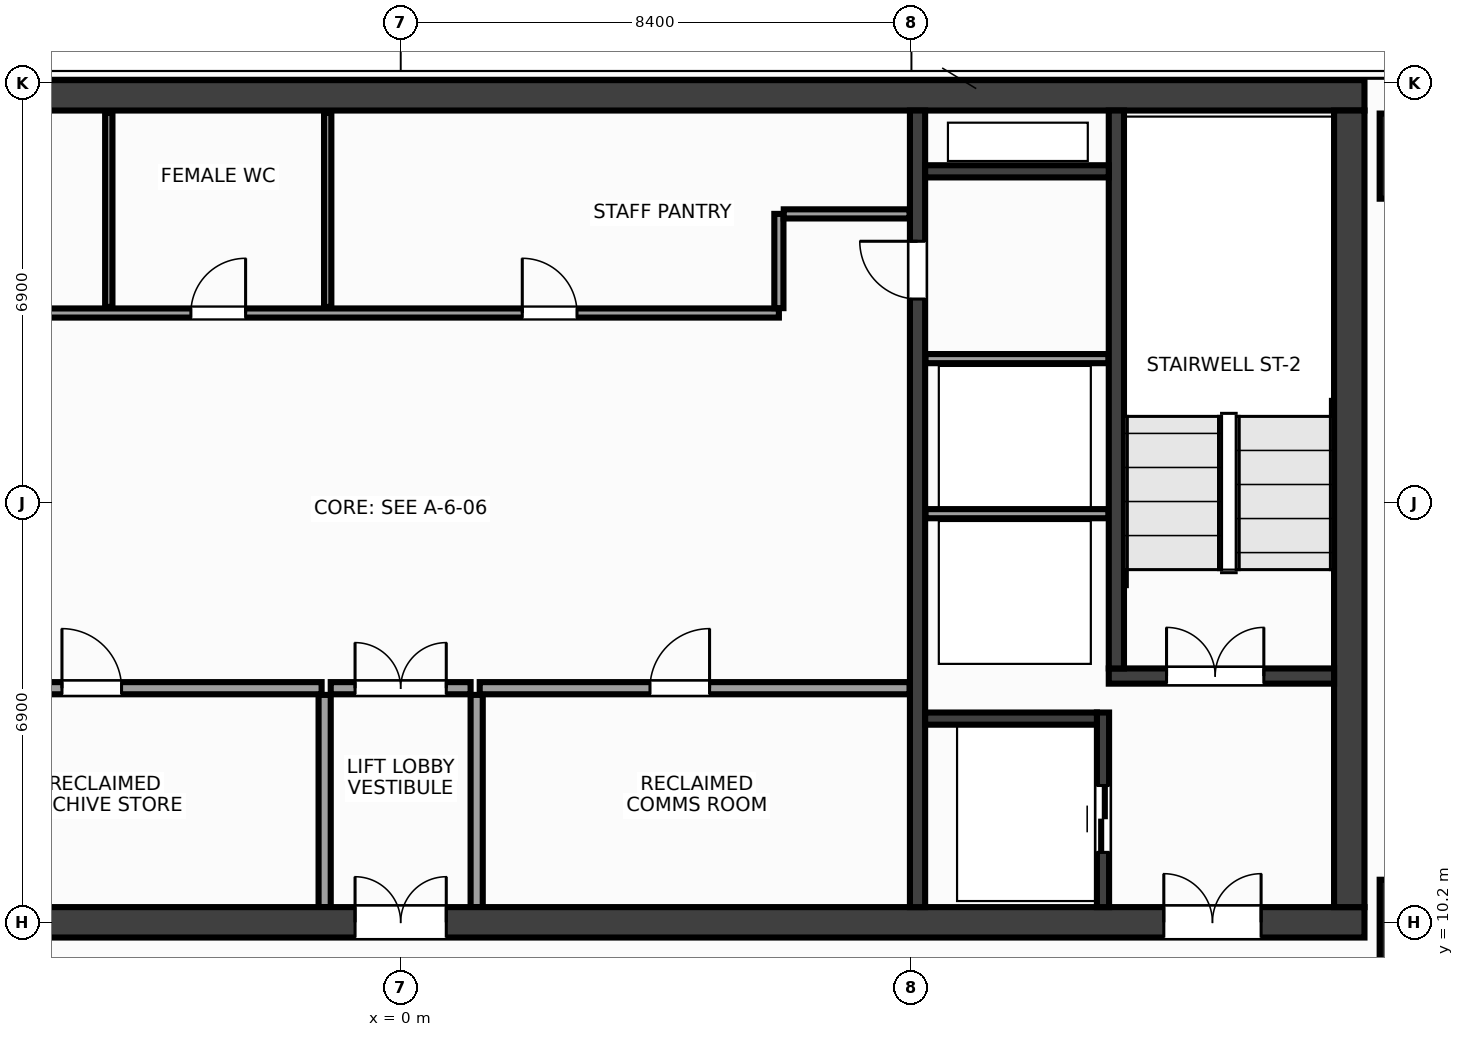
"""IFC4 building model, lengths in metres.
Left out: names, types, materials, properties, quantities, classifications, styles, units other than length and angle.
Written with IfcOpenShell. Run it as: python <this file> out.ifc"""

import sys

from ifc_helpers import new_model, si_unit, direction, frame, frame_2d, origin, origin_2d, place, context, subcontext, project, spatial, rectangle, extrude, source, transform, mapped, element, fill, save


model = new_model("IFC4")
c1 = context("Model", 3, precision=1e-05, world=origin(), true_north=direction((0.0, 1.0)))
c2 = subcontext(c1, "Body", "Model", "MODEL_VIEW")
j1 = project(units=[si_unit("LENGTHUNIT", "METRE"), si_unit("PLANEANGLEUNIT", "RADIAN")], contexts=[c1])
p1 = place(None, origin())
s1 = spatial("IfcSite", under=j1, at=p1, CompositionType="ELEMENT")
p2 = place(p1, origin())
s2 = spatial("IfcBuilding", under=s1, at=p2, CompositionType="ELEMENT")
p3 = place(p2, frame((0.0, 0.0, 228.8)))
s3 = spatial("IfcBuildingStorey", under=s2, at=p3, CompositionType="ELEMENT", Elevation=228.8)
m1 = source(origin(), c2, "Body", "SweptSolid", [
    extrude(rectangle(XDim=31.7, YDim=0.5, at=frame_2d((15.85, 0.0))), origin(), (0.0, 0.0, 1.0), 3.6),
])
p4 = place(p3, frame((-15.85, 23.8, 0.0), z_axis=(0.0, 0.0, 1.0), x_axis=(1.0, 0.0, 0.0)))
e1 = element("IfcWall", 1, at=p4, inside=s3, PredefinedType="SHEAR", context=c2, shape_type="MappedRepresentation", body=[
    mapped(m1, transform((0.0, 0.0, 0.0), x_axis=(1.0, 0.0, 0.0), y_axis=(0.0, 1.0, 0.0), z_axis=(0.0, 0.0, 1.0), scale=1.0)),
])
p5 = place(p3, frame((-15.85, 10.2, 0.0), z_axis=(0.0, 0.0, 1.0), x_axis=(1.0, 0.0, 0.0)))
e2 = element("IfcWall", 2, at=p5, inside=s3, PredefinedType="SHEAR", context=c2, shape_type="MappedRepresentation", body=[
    mapped(m1, transform((0.0, 0.0, 0.0), x_axis=(1.0, 0.0, 0.0), y_axis=(0.0, 1.0, 0.0), z_axis=(0.0, 0.0, 1.0), scale=1.0)),
])
p6 = place(p5, frame((1.7, 0.0, 0.0)))
e3 = element("IfcOpeningElement", 3, at=p6, cuts=e2, PredefinedType="OPENING", context=c2, shape_type="SweptSolid", body=[
    extrude(rectangle(XDim=1.6, YDim=2.15, at=frame_2d((0.8, 1.075))), frame((0.0, 0.262, 0.0), z_axis=(0.0, -1.0, 0.0), x_axis=(1.0, 0.0, 0.0)), (0.0, 0.0, 1.0), 0.524),
])
p7 = place(p5, frame((28.4, 0.0, 0.0)))
e4 = element("IfcOpeningElement", 4, at=p7, cuts=e2, PredefinedType="OPENING", context=c2, shape_type="SweptSolid", body=[
    extrude(rectangle(XDim=1.6, YDim=2.15, at=frame_2d((0.8, 1.075))), frame((0.0, 0.262, 0.0), z_axis=(0.0, -1.0, 0.0), x_axis=(1.0, 0.0, 0.0)), (0.0, 0.0, 1.0), 0.524),
])
p8 = place(p5, frame((15.1, 0.0, 0.0)))
e5 = element("IfcOpeningElement", 5, at=p8, cuts=e2, PredefinedType="OPENING", context=c2, shape_type="SweptSolid", body=[
    extrude(rectangle(XDim=1.5, YDim=2.2, at=frame_2d((0.75, 1.1))), frame((0.0, 0.262, 0.0), z_axis=(0.0, -1.0, 0.0), x_axis=(1.0, 0.0, 0.0)), (0.0, 0.0, 1.0), 0.524),
])
m2 = source(origin(), c2, "Body", "SweptSolid", [
    extrude(rectangle(XDim=13.1, YDim=0.5, at=frame_2d((6.55, 0.0))), origin(), (0.0, 0.0, 1.0), 3.6),
])
p9 = place(p3, frame((15.6, 10.45, 0.0), z_axis=(0.0, 0.0, 1.0), x_axis=(0.0, 1.0, 0.0)))
e6 = element("IfcWall", 6, at=p9, inside=s3, PredefinedType="SHEAR", context=c2, shape_type="MappedRepresentation", body=[
    mapped(m2, transform((0.0, 0.0, 0.0), x_axis=(1.0, 0.0, 0.0), y_axis=(0.0, 1.0, 0.0), z_axis=(0.0, 0.0, 1.0), scale=1.0)),
])
m3 = source(origin(), c2, "Body", "SweptSolid", [
    extrude(rectangle(XDim=13.1, YDim=0.25, at=frame_2d((6.55, 0.0))), origin(), (0.0, 0.0, 1.0), 3.6),
])
p10 = place(p3, frame((8.5, 10.45, 0.0), z_axis=(0.0, 0.0, 1.0), x_axis=(0.0, 1.0, 0.0)))
e7 = element("IfcWall", 7, at=p10, inside=s3, PredefinedType="SHEAR", context=c2, shape_type="MappedRepresentation", body=[
    mapped(m3, transform((0.0, 0.0, 0.0), x_axis=(1.0, 0.0, 0.0), y_axis=(0.0, 1.0, 0.0), z_axis=(0.0, 0.0, 1.0), scale=1.0)),
])
p11 = place(p10, frame((10.0, 0.0, 0.0)))
e8 = element("IfcOpeningElement", 8, at=p11, cuts=e7, PredefinedType="OPENING", context=c2, shape_type="SweptSolid", body=[
    extrude(rectangle(XDim=0.95, YDim=2.15, at=frame_2d((0.475, 1.075))), frame((0.0, 0.137, 0.0), z_axis=(0.0, -1.0, 0.0), x_axis=(1.0, 0.0, 0.0)), (0.0, 0.0, 1.0), 0.274),
])
m4 = source(origin(), c2, "Body", "SweptSolid", [
    extrude(rectangle(XDim=3.705, YDim=0.25, at=frame_2d((1.853, 0.0))), origin(), (0.0, 0.0, 1.0), 3.6),
])
p12 = place(p3, frame((11.645, 14.25, 0.0), z_axis=(0.0, 0.0, 1.0), x_axis=(1.0, 0.0, 0.0)))
e9 = element("IfcWall", 9, at=p12, inside=s3, PredefinedType="SHEAR", context=c2, shape_type="MappedRepresentation", body=[
    mapped(m4, transform((0.0, 0.0, 0.0), x_axis=(1.0, 0.0, 0.0), y_axis=(0.0, 1.0, 0.0), z_axis=(0.0, 0.0, 1.0), scale=1.0)),
])
p13 = place(p12, frame((0.95, 0.0, 0.0)))
e10 = element("IfcOpeningElement", 10, at=p13, cuts=e9, PredefinedType="OPENING", context=c2, shape_type="SweptSolid", body=[
    extrude(rectangle(XDim=1.6, YDim=2.15, at=frame_2d((0.8, 1.075))), frame((0.0, 0.137, 0.0), z_axis=(0.0, -1.0, 0.0), x_axis=(1.0, 0.0, 0.0)), (0.0, 0.0, 1.0), 0.274),
])
m5 = source(origin(), c2, "Body", "SweptSolid", [
    extrude(rectangle(XDim=9.175, YDim=0.25, at=frame_2d((4.587, 0.0))), origin(), (0.0, 0.0, 1.0), 3.6),
])
p14 = place(p3, frame((11.77, 14.375, 0.0), z_axis=(0.0, 0.0, 1.0), x_axis=(0.0, 1.0, 0.0)))
e11 = element("IfcWall", 11, at=p14, inside=s3, PredefinedType="SHEAR", context=c2, shape_type="MappedRepresentation", body=[
    mapped(m5, transform((0.0, 0.0, 0.0), x_axis=(1.0, 0.0, 0.0), y_axis=(0.0, 1.0, 0.0), z_axis=(0.0, 0.0, 1.0), scale=1.0)),
])
m6 = source(origin(), c2, "Body", "SweptSolid", [
    extrude(rectangle(XDim=3.2, YDim=0.2, at=frame_2d((1.6, 0.0))), origin(), (0.0, 0.0, 1.0), 3.6),
])
p15 = place(p3, frame((11.55, 10.45, 0.0), z_axis=(0.0, 0.0, 1.0), x_axis=(0.0, 1.0, 0.0)))
e12 = element("IfcWall", 12, at=p15, inside=s3, PredefinedType="SHEAR", context=c2, shape_type="MappedRepresentation", body=[
    mapped(m6, transform((0.0, 0.0, 0.0), x_axis=(1.0, 0.0, 0.0), y_axis=(0.0, 1.0, 0.0), z_axis=(0.0, 0.0, 1.0), scale=1.0)),
])
p16 = place(p15, frame((0.9, 0.0, 0.0)))
e13 = element("IfcOpeningElement", 13, at=p16, cuts=e12, PredefinedType="OPENING", context=c2, shape_type="SweptSolid", body=[
    extrude(rectangle(XDim=1.1, YDim=2.15, at=frame_2d((0.55, 1.075))), frame((0.0, 0.112, 0.0), z_axis=(0.0, -1.0, 0.0), x_axis=(1.0, 0.0, 0.0)), (0.0, 0.0, 1.0), 0.224),
])
m7 = source(origin(), c2, "Body", "SweptSolid", [
    extrude(rectangle(XDim=2.825, YDim=0.2, at=frame_2d((1.413, 0.0))), origin(), (0.0, 0.0, 1.0), 3.6),
])
p17 = place(p3, frame((8.625, 13.55, 0.0), z_axis=(0.0, 0.0, 1.0), x_axis=(1.0, 0.0, 0.0)))
e14 = element("IfcWall", 14, at=p17, inside=s3, PredefinedType="SHEAR", context=c2, shape_type="MappedRepresentation", body=[
    mapped(m7, transform((0.0, 0.0, 0.0), x_axis=(1.0, 0.0, 0.0), y_axis=(0.0, 1.0, 0.0), z_axis=(0.0, 0.0, 1.0), scale=1.0)),
])
m8 = source(origin(), c2, "Body", "SweptSolid", [
    extrude(rectangle(XDim=3.02, YDim=0.2, at=frame_2d((1.51, 0.0))), origin(), (0.0, 0.0, 1.0), 3.6),
])
p18 = place(p3, frame((8.625, 22.55, 0.0), z_axis=(0.0, 0.0, 1.0), x_axis=(1.0, 0.0, 0.0)))
e15 = element("IfcWall", 15, at=p18, inside=s3, PredefinedType="SHEAR", context=c2, shape_type="MappedRepresentation", body=[
    mapped(m8, transform((0.0, 0.0, 0.0), x_axis=(1.0, 0.0, 0.0), y_axis=(0.0, 1.0, 0.0), z_axis=(0.0, 0.0, 1.0), scale=1.0)),
])
m9 = source(origin(), c2, "Body", "SweptSolid", [
    extrude(rectangle(XDim=1.4, YDim=1.4, at=origin_2d()), origin(), (0.0, 0.0, 1.0), 3.6),
])
for number, where, z_axis, x_axis in (
    (16, (16.8, 10.2, 0.0), (0.0, 0.0, 1.0), (1.0, 0.0, 0.0)),
    (17, (16.8, 22.8, 0.0), (0.0, 0.0, 1.0), (1.0, 0.0, 0.0)),
):
    element("IfcColumn", number, at=place(p3, frame(where, z_axis=z_axis, x_axis=x_axis)), inside=s3, PredefinedType="COLUMN", context=c2, shape_type="MappedRepresentation", body=[
        mapped(m9, transform((0.0, 0.0, 0.0), x_axis=(1.0, 0.0, 0.0), y_axis=(0.0, 1.0, 0.0), z_axis=(0.0, 0.0, 1.0), scale=1.0)),
    ])
m10 = source(origin(), c2, "Body", "SweptSolid", [
    extrude(rectangle(XDim=3.01, YDim=0.15, at=frame_2d((1.505, 0.0))), origin(), (0.0, 0.0, 1.0), 3.37),
])
for number, where, z_axis, x_axis in (
    (18, (8.63, 16.92, 0.0), (0.0, 0.0, 1.0), (1.0, 0.0, 0.0)),
    (19, (8.63, 19.47, 0.0), (0.0, 0.0, 1.0), (1.0, 0.0, 0.0)),
):
    element("IfcWall", number, at=place(p3, frame(where, z_axis=z_axis, x_axis=x_axis)), inside=s3, PredefinedType="PARTITIONING", context=c2, shape_type="MappedRepresentation", body=[
        mapped(m10, transform((0.0, 0.0, 0.0), x_axis=(1.0, 0.0, 0.0), y_axis=(0.0, 1.0, 0.0), z_axis=(0.0, 0.0, 1.0), scale=1.0)),
    ])
m11 = source(origin(), c2, "Body", "SweptSolid", [
    extrude(rectangle(XDim=7.07, YDim=0.2, at=frame_2d((3.535, 0.0))), origin(), (0.0, 0.0, 1.0), 3.37),
])
p19 = place(p3, frame((-8.37, 14.05, 0.0), z_axis=(0.0, 0.0, 1.0), x_axis=(1.0, 0.0, 0.0)))
e20 = element("IfcWall", 20, at=p19, inside=s3, PredefinedType="PARTITIONING", context=c2, shape_type="MappedRepresentation", body=[
    mapped(m11, transform((0.0, 0.0, 0.0), x_axis=(1.0, 0.0, 0.0), y_axis=(0.0, 1.0, 0.0), z_axis=(0.0, 0.0, 1.0), scale=1.0)),
])
p20 = place(p19, frame((2.8, 0.0, 0.0)))
e21 = element("IfcOpeningElement", 21, at=p20, cuts=e20, PredefinedType="OPENING", context=c2, shape_type="SweptSolid", body=[
    extrude(rectangle(XDim=0.98, YDim=2.15, at=frame_2d((0.49, 1.075))), frame((0.0, 0.112, 0.0), z_axis=(0.0, -1.0, 0.0), x_axis=(1.0, 0.0, 0.0)), (0.0, 0.0, 1.0), 0.224),
])
p21 = place(p3, frame((1.3, 14.05, 0.0), z_axis=(0.0, 0.0, 1.0), x_axis=(1.0, 0.0, 0.0)))
e22 = element("IfcWall", 22, at=p21, inside=s3, PredefinedType="PARTITIONING", context=c2, shape_type="MappedRepresentation", body=[
    mapped(m11, transform((0.0, 0.0, 0.0), x_axis=(1.0, 0.0, 0.0), y_axis=(0.0, 1.0, 0.0), z_axis=(0.0, 0.0, 1.0), scale=1.0)),
])
p22 = place(p21, frame((2.8, 0.0, 0.0)))
e23 = element("IfcOpeningElement", 23, at=p22, cuts=e22, PredefinedType="OPENING", context=c2, shape_type="SweptSolid", body=[
    extrude(rectangle(XDim=0.98, YDim=2.15, at=frame_2d((0.49, 1.075))), frame((0.0, 0.112, 0.0), z_axis=(0.0, -1.0, 0.0), x_axis=(1.0, 0.0, 0.0)), (0.0, 0.0, 1.0), 0.224),
])
m12 = source(origin(), c2, "Body", "SweptSolid", [
    extrude(rectangle(XDim=3.49, YDim=0.2, at=frame_2d((1.745, 0.0))), origin(), (0.0, 0.0, 1.0), 3.37),
])
for number, where, z_axis, x_axis in (
    (24, (-1.25, 10.45, 0.0), (0.0, 0.0, 1.0), (0.0, 1.0, 0.0)),
    (25, (1.25, 10.45, 0.0), (0.0, 0.0, 1.0), (0.0, 1.0, 0.0)),
):
    element("IfcWall", number, at=place(p3, frame(where, z_axis=z_axis, x_axis=x_axis)), inside=s3, PredefinedType="PARTITIONING", context=c2, shape_type="MappedRepresentation", body=[
        mapped(m12, transform((0.0, 0.0, 0.0), x_axis=(1.0, 0.0, 0.0), y_axis=(0.0, 1.0, 0.0), z_axis=(0.0, 0.0, 1.0), scale=1.0)),
    ])
m13 = source(origin(), c2, "Body", "SweptSolid", [
    extrude(rectangle(XDim=2.3, YDim=0.2, at=frame_2d((1.15, 0.0))), origin(), (0.0, 0.0, 1.0), 3.37),
])
p23 = place(p3, frame((-1.15, 14.05, 0.0), z_axis=(0.0, 0.0, 1.0), x_axis=(1.0, 0.0, 0.0)))
e26 = element("IfcWall", 26, at=p23, inside=s3, PredefinedType="PARTITIONING", context=c2, shape_type="MappedRepresentation", body=[
    mapped(m13, transform((0.0, 0.0, 0.0), x_axis=(1.0, 0.0, 0.0), y_axis=(0.0, 1.0, 0.0), z_axis=(0.0, 0.0, 1.0), scale=1.0)),
])
p24 = place(p23, frame((0.4, 0.0, 0.0)))
e27 = element("IfcOpeningElement", 27, at=p24, cuts=e26, PredefinedType="OPENING", context=c2, shape_type="SweptSolid", body=[
    extrude(rectangle(XDim=1.5, YDim=2.2, at=frame_2d((0.75, 1.1))), frame((0.0, 0.112, 0.0), z_axis=(0.0, -1.0, 0.0), x_axis=(1.0, 0.0, 0.0)), (0.0, 0.0, 1.0), 0.224),
])
m14 = source(origin(), c2, "Body", "SweptSolid", [
    extrude(rectangle(XDim=14.59, YDim=0.15, at=frame_2d((7.295, 0.0))), origin(), (0.0, 0.0, 1.0), 3.37),
])
p25 = place(p3, frame((-8.37, 20.22, 0.0), z_axis=(0.0, 0.0, 1.0), x_axis=(1.0, 0.0, 0.0)))
e28 = element("IfcWall", 28, at=p25, inside=s3, PredefinedType="PARTITIONING", context=c2, shape_type="MappedRepresentation", body=[
    mapped(m14, transform((0.0, 0.0, 0.0), x_axis=(1.0, 0.0, 0.0), y_axis=(0.0, 1.0, 0.0), z_axis=(0.0, 0.0, 1.0), scale=1.0)),
])
p26 = place(p25, frame((1.36, 0.0, 0.0)))
e29 = element("IfcOpeningElement", 29, at=p26, cuts=e28, PredefinedType="OPENING", context=c2, shape_type="SweptSolid", body=[
    extrude(rectangle(XDim=0.9, YDim=2.15, at=frame_2d((0.45, 1.075))), frame((0.0, 0.087, 0.0), z_axis=(0.0, -1.0, 0.0), x_axis=(1.0, 0.0, 0.0)), (0.0, 0.0, 1.0), 0.174),
])
p27 = place(p25, frame((4.92, 0.0, 0.0)))
e30 = element("IfcOpeningElement", 30, at=p27, cuts=e28, PredefinedType="OPENING", context=c2, shape_type="SweptSolid", body=[
    extrude(rectangle(XDim=0.9, YDim=2.15, at=frame_2d((0.45, 1.075))), frame((0.0, 0.087, 0.0), z_axis=(0.0, -1.0, 0.0), x_axis=(1.0, 0.0, 0.0)), (0.0, 0.0, 1.0), 0.174),
])
p28 = place(p25, frame((10.37, 0.0, 0.0)))
e31 = element("IfcOpeningElement", 31, at=p28, cuts=e28, PredefinedType="OPENING", context=c2, shape_type="SweptSolid", body=[
    extrude(rectangle(XDim=0.9, YDim=2.15, at=frame_2d((0.45, 1.075))), frame((0.0, 0.087, 0.0), z_axis=(0.0, -1.0, 0.0), x_axis=(1.0, 0.0, 0.0)), (0.0, 0.0, 1.0), 0.174),
])
m15 = source(origin(), c2, "Body", "SweptSolid", [
    extrude(rectangle(XDim=1.55, YDim=0.15, at=frame_2d((0.775, 0.0))), origin(), (0.0, 0.0, 1.0), 3.37),
])
p29 = place(p3, frame((6.22, 20.3, 0.0), z_axis=(0.0, 0.0, 1.0), x_axis=(0.0, 1.0, 0.0)))
e32 = element("IfcWall", 32, at=p29, inside=s3, PredefinedType="PARTITIONING", context=c2, shape_type="MappedRepresentation", body=[
    mapped(m15, transform((0.0, 0.0, 0.0), x_axis=(1.0, 0.0, 0.0), y_axis=(0.0, 1.0, 0.0), z_axis=(0.0, 0.0, 1.0), scale=1.0)),
])
m16 = source(origin(), c2, "Body", "SweptSolid", [
    extrude(rectangle(XDim=2.07, YDim=0.15, at=frame_2d((1.035, 0.0))), origin(), (0.0, 0.0, 1.0), 3.37),
])
p30 = place(p3, frame((6.3, 21.85, 0.0), z_axis=(0.0, 0.0, 1.0), x_axis=(1.0, 0.0, 0.0)))
e33 = element("IfcWall", 33, at=p30, inside=s3, PredefinedType="PARTITIONING", context=c2, shape_type="MappedRepresentation", body=[
    mapped(m16, transform((0.0, 0.0, 0.0), x_axis=(1.0, 0.0, 0.0), y_axis=(0.0, 1.0, 0.0), z_axis=(0.0, 0.0, 1.0), scale=1.0)),
])
m17 = source(origin(), c2, "Body", "SweptSolid", [
    extrude(rectangle(XDim=3.19, YDim=0.12, at=frame_2d((1.595, 0.0))), origin(), (0.0, 0.0, 1.0), 3.37),
])
for number, where, z_axis, x_axis in (
    (34, (-4.8, 20.32, 0.0), (0.0, 0.0, 1.0), (0.0, 1.0, 0.0)),
    (35, (-1.2, 20.32, 0.0), (0.0, 0.0, 1.0), (0.0, 1.0, 0.0)),
):
    element("IfcWall", number, at=place(p3, frame(where, z_axis=z_axis, x_axis=x_axis)), inside=s3, PredefinedType="PARTITIONING", context=c2, shape_type="MappedRepresentation", body=[
        mapped(m17, transform((0.0, 0.0, 0.0), x_axis=(1.0, 0.0, 0.0), y_axis=(0.0, 1.0, 0.0), z_axis=(0.0, 0.0, 1.0), scale=1.0)),
    ])
m18 = source(origin(), c2, "Body", "SweptSolid", [
    extrude(rectangle(XDim=1.6, YDim=2.15, at=frame_2d((0.8, 1.075))), frame((0.0, 0.025, 0.0), z_axis=(0.0, -1.0, 0.0), x_axis=(1.0, 0.0, 0.0)), (0.0, 0.0, 1.0), 0.05),
])
p31 = place(p13, origin())
e36 = element("IfcDoor", 36, at=p31, inside=s3, OperationType="DOUBLE_DOOR_SINGLE_SWING", PredefinedType="DOOR", context=c2, shape_type="MappedRepresentation", body=[
    mapped(m18, transform((0.0, 0.0, 0.0), x_axis=(1.0, 0.0, 0.0), y_axis=(0.0, 1.0, 0.0), z_axis=(0.0, 0.0, 1.0), scale=1.0)),
])
fill(e10, e36)
p32 = place(p7, origin())
e37 = element("IfcDoor", 37, at=p32, inside=s3, OperationType="DOUBLE_DOOR_SINGLE_SWING", PredefinedType="DOOR", context=c2, shape_type="MappedRepresentation", body=[
    mapped(m18, transform((0.0, 0.0, 0.0), x_axis=(1.0, 0.0, 0.0), y_axis=(0.0, 1.0, 0.0), z_axis=(0.0, 0.0, 1.0), scale=1.0)),
])
fill(e4, e37)
m19 = source(origin(), c2, "Body", "SweptSolid", [
    extrude(rectangle(XDim=1.1, YDim=2.15, at=frame_2d((0.55, 1.075))), frame((0.0, 0.025, 0.0), z_axis=(0.0, -1.0, 0.0), x_axis=(1.0, 0.0, 0.0)), (0.0, 0.0, 1.0), 0.05),
])
p33 = place(p16, origin())
e38 = element("IfcDoor", 38, at=p33, inside=s3, OperationType="DOUBLE_DOOR_SLIDING", PredefinedType="DOOR", context=c2, shape_type="MappedRepresentation", body=[
    mapped(m19, transform((0.0, 0.0, 0.0), x_axis=(1.0, 0.0, 0.0), y_axis=(0.0, 1.0, 0.0), z_axis=(0.0, 0.0, 1.0), scale=1.0)),
])
fill(e13, e38)
m20 = source(origin(), c2, "Body", "SweptSolid", [
    extrude(rectangle(XDim=0.95, YDim=2.15, at=frame_2d((0.475, 1.075))), frame((0.0, 0.025, 0.0), z_axis=(0.0, -1.0, 0.0), x_axis=(1.0, 0.0, 0.0)), (0.0, 0.0, 1.0), 0.05),
])
p34 = place(p11, origin())
e39 = element("IfcDoor", 39, at=p34, inside=s3, OperationType="SINGLE_SWING_RIGHT", PredefinedType="DOOR", context=c2, shape_type="MappedRepresentation", body=[
    mapped(m20, transform((0.0, 0.0, 0.0), x_axis=(1.0, 0.0, 0.0), y_axis=(0.0, 1.0, 0.0), z_axis=(0.0, 0.0, 1.0), scale=1.0)),
])
fill(e8, e39)
m21 = source(origin(), c2, "Body", "SweptSolid", [
    extrude(rectangle(XDim=0.98, YDim=2.15, at=frame_2d((0.49, 1.075))), frame((0.0, 0.025, 0.0), z_axis=(0.0, -1.0, 0.0), x_axis=(1.0, 0.0, 0.0)), (0.0, 0.0, 1.0), 0.05),
])
p35 = place(p20, origin())
e40 = element("IfcDoor", 40, at=p35, inside=s3, OperationType="SINGLE_SWING_LEFT", PredefinedType="DOOR", context=c2, shape_type="MappedRepresentation", body=[
    mapped(m21, transform((0.0, 0.0, 0.0), x_axis=(1.0, 0.0, 0.0), y_axis=(0.0, 1.0, 0.0), z_axis=(0.0, 0.0, 1.0), scale=1.0)),
])
fill(e21, e40)
p36 = place(p22, origin())
e41 = element("IfcDoor", 41, at=p36, inside=s3, OperationType="SINGLE_SWING_RIGHT", PredefinedType="DOOR", context=c2, shape_type="MappedRepresentation", body=[
    mapped(m21, transform((0.0, 0.0, 0.0), x_axis=(1.0, 0.0, 0.0), y_axis=(0.0, 1.0, 0.0), z_axis=(0.0, 0.0, 1.0), scale=1.0)),
])
fill(e23, e41)
m22 = source(origin(), c2, "Body", "SweptSolid", [
    extrude(rectangle(XDim=1.5, YDim=2.2, at=frame_2d((0.75, 1.1))), frame((0.0, 0.025, 0.0), z_axis=(0.0, -1.0, 0.0), x_axis=(1.0, 0.0, 0.0)), (0.0, 0.0, 1.0), 0.05),
])
p37 = place(p24, origin())
e42 = element("IfcDoor", 42, at=p37, inside=s3, OperationType="DOUBLE_DOOR_SINGLE_SWING", PredefinedType="DOOR", context=c2, shape_type="MappedRepresentation", body=[
    mapped(m22, transform((0.0, 0.0, 0.0), x_axis=(1.0, 0.0, 0.0), y_axis=(0.0, 1.0, 0.0), z_axis=(0.0, 0.0, 1.0), scale=1.0)),
])
fill(e27, e42)
p38 = place(p8, origin())
e43 = element("IfcDoor", 43, at=p38, inside=s3, OperationType="DOUBLE_DOOR_SINGLE_SWING", PredefinedType="DOOR", context=c2, shape_type="MappedRepresentation", body=[
    mapped(m22, transform((0.0, 0.0, 0.0), x_axis=(1.0, 0.0, 0.0), y_axis=(0.0, 1.0, 0.0), z_axis=(0.0, 0.0, 1.0), scale=1.0)),
])
fill(e5, e43)
m23 = source(origin(), c2, "Body", "SweptSolid", [
    extrude(rectangle(XDim=0.9, YDim=2.15, at=frame_2d((0.45, 1.075))), frame((0.0, 0.025, 0.0), z_axis=(0.0, -1.0, 0.0), x_axis=(1.0, 0.0, 0.0)), (0.0, 0.0, 1.0), 0.05),
])
p39 = place(p27, origin())
e44 = element("IfcDoor", 44, at=p39, inside=s3, OperationType="SINGLE_SWING_RIGHT", PredefinedType="DOOR", context=c2, shape_type="MappedRepresentation", body=[
    mapped(m23, transform((0.0, 0.0, 0.0), x_axis=(1.0, 0.0, 0.0), y_axis=(0.0, 1.0, 0.0), z_axis=(0.0, 0.0, 1.0), scale=1.0)),
])
fill(e30, e44)
p40 = place(p28, origin())
e45 = element("IfcDoor", 45, at=p40, inside=s3, OperationType="SINGLE_SWING_LEFT", PredefinedType="DOOR", context=c2, shape_type="MappedRepresentation", body=[
    mapped(m23, transform((0.0, 0.0, 0.0), x_axis=(1.0, 0.0, 0.0), y_axis=(0.0, 1.0, 0.0), z_axis=(0.0, 0.0, 1.0), scale=1.0)),
])
fill(e31, e45)
save(model, sys.argv[1])
